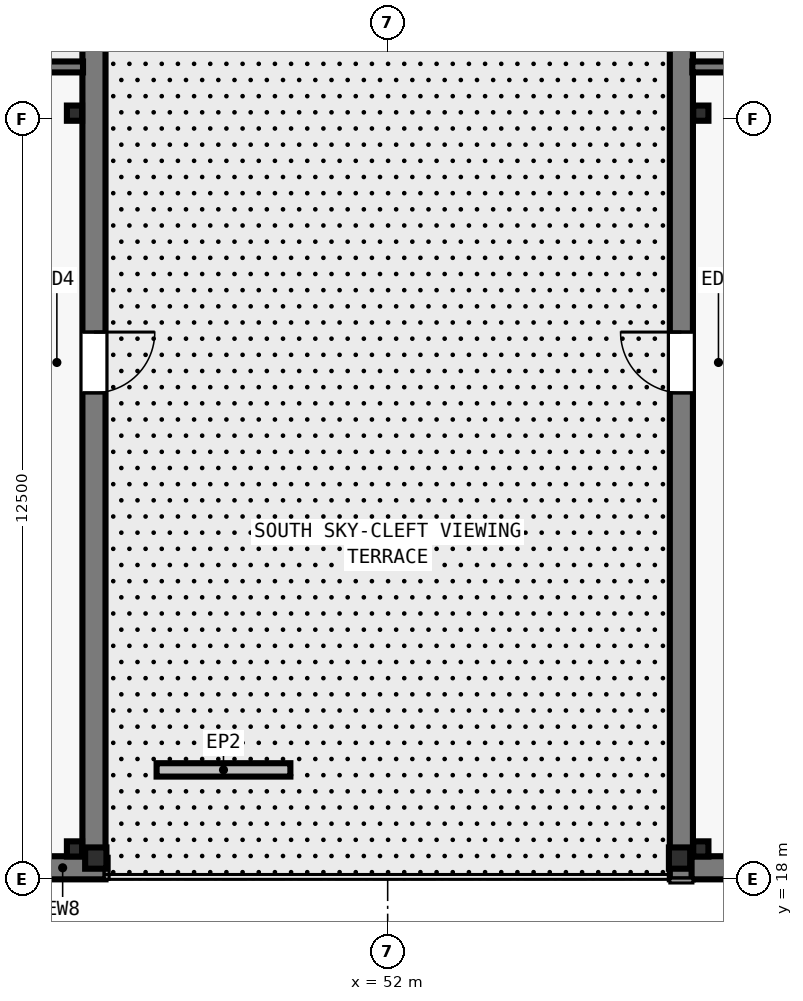
"""IFC4 building model, lengths in metres.
Left out: names, types, materials, properties, quantities, classifications, styles, units other than length and angle.
Written with IfcOpenShell. Run it as: python <this file> out.ifc"""

import sys

from ifc_helpers import new_model, si_unit, direction, frame, frame_2d, origin, origin_2d, place, context, subcontext, project, spatial, rectangle, i_section, extrude, element, fill, save


model = new_model("IFC4")
c1 = context("Model", 3, precision=1e-05, world=origin(), true_north=direction((0.0, 1.0)))
c2 = subcontext(c1, "Body", "Model", "MODEL_VIEW")
j1 = project(units=[si_unit("LENGTHUNIT", "METRE"), si_unit("PLANEANGLEUNIT", "RADIAN")], contexts=[c1])
p1 = place(None, origin())
s1 = spatial("IfcSite", under=j1, at=p1, CompositionType="ELEMENT")
p2 = place(p1, origin())
s2 = spatial("IfcBuilding", under=s1, at=p2, CompositionType="ELEMENT")
p3 = place(p2, frame((0.0, 0.0, 324.5)))
s3 = spatial("IfcBuildingStorey", under=s2, at=p3, CompositionType="ELEMENT", Elevation=324.5)
for number, where, z_axis, x_axis in (
    (1, (47.2, 18.35, 0.0), (0.0, 0.0, 1.0), (1.0, 0.0, 0.0)),
    (2, (56.8, 18.35, 0.0), (0.0, 0.0, 1.0), (1.0, 0.0, 0.0)),
):
    element("IfcColumn", number, at=place(p3, frame(where, z_axis=z_axis, x_axis=x_axis)), inside=s3, PredefinedType="COLUMN", context=c2, shape_type="SweptSolid", body=[
        extrude(i_section(OverallWidth=0.35, OverallDepth=0.35, WebThickness=0.02, FlangeThickness=0.028, at=origin_2d()), origin(), (0.0, 0.0, 1.0), 5.5),
    ])
for number, where, z_axis, x_axis in (
    (3, (46.85, 18.5, 0.0), (0.0, 0.0, 1.0), (1.0, 0.0, 0.0)),
    (4, (46.85, 30.6, 0.0), (0.0, 0.0, 1.0), (1.0, 0.0, 0.0)),
    (5, (57.15, 18.5, 0.0), (0.0, 0.0, 1.0), (1.0, 0.0, 0.0)),
    (6, (57.15, 30.6, 0.0), (0.0, 0.0, 1.0), (1.0, 0.0, 0.0)),
):
    element("IfcColumn", number, at=place(p3, frame(where, z_axis=z_axis, x_axis=x_axis)), inside=s3, PredefinedType="PILASTER", context=c2, shape_type="SweptSolid", body=[
        extrude(i_section(OverallWidth=0.203, OverallDepth=0.203, WebThickness=0.009, FlangeThickness=0.014, FilletRadius=0.01, at=origin_2d()), origin(), (0.0, 0.0, 1.0), 5.5),
    ])
p4 = place(p3, frame((47.17, 60.0, 0.0), z_axis=(0.0, 0.0, 1.0), x_axis=(0.0, -1.0, 0.0)))
e7 = element("IfcWall", 7, at=p4, inside=s3, PredefinedType="SOLIDWALL", context=c2, shape_type="SweptSolid", body=[
    extrude(rectangle(XDim=41.642, YDim=0.38, at=frame_2d((20.821, 0.0))), origin(), (0.0, 0.0, 1.0), 5.25),
])
p5 = place(p4, frame((9.0, 0.0, 0.0)))
e8 = element("IfcOpeningElement", 8, at=p5, cuts=e7, PredefinedType="OPENING", context=c2, shape_type="SweptSolid", body=[
    extrude(rectangle(XDim=1.0, YDim=2.15, at=frame_2d((0.5, 1.075))), frame((0.0, 0.2, 0.0), z_axis=(0.0, -1.0, 0.0), x_axis=(1.0, 0.0, 0.0)), (0.0, 0.0, 1.0), 0.4),
])
p6 = place(p4, frame((33.0, 0.0, 0.0)))
e9 = element("IfcOpeningElement", 9, at=p6, cuts=e7, PredefinedType="OPENING", context=c2, shape_type="SweptSolid", body=[
    extrude(rectangle(XDim=1.0, YDim=2.15, at=frame_2d((0.5, 1.075))), frame((0.0, 0.2, 0.0), z_axis=(0.0, -1.0, 0.0), x_axis=(1.0, 0.0, 0.0)), (0.0, 0.0, 1.0), 0.4),
])
p7 = place(p3, frame((47.36, 18.19, 0.0), z_axis=(0.0, 0.0, 1.0), x_axis=(-1.0, 0.0, 0.0)))
e10 = element("IfcWall", 10, at=p7, inside=s3, PredefinedType="SOLIDWALL", context=c2, shape_type="SweptSolid", body=[
    extrude(rectangle(XDim=1.41, YDim=0.38, at=frame_2d((0.705, 0.0))), origin(), (0.0, 0.0, 1.0), 5.25),
])
p8 = place(p3, frame((56.83, 18.0, 0.0), z_axis=(0.0, 0.0, 1.0), x_axis=(0.0, 1.0, 0.0)))
e11 = element("IfcWall", 11, at=p8, inside=s3, PredefinedType="SOLIDWALL", context=c2, shape_type="SweptSolid", body=[
    extrude(rectangle(XDim=41.642, YDim=0.38, at=frame_2d((20.821, 0.0))), origin(), (0.0, 0.0, 1.0), 5.25),
])
p9 = place(p8, frame((32.0, 0.0, 0.0)))
e12 = element("IfcOpeningElement", 12, at=p9, cuts=e11, PredefinedType="OPENING", context=c2, shape_type="SweptSolid", body=[
    extrude(rectangle(XDim=1.0, YDim=2.15, at=frame_2d((0.5, 1.075))), frame((0.0, 0.2, 0.0), z_axis=(0.0, -1.0, 0.0), x_axis=(1.0, 0.0, 0.0)), (0.0, 0.0, 1.0), 0.4),
])
p10 = place(p8, frame((8.0, 0.0, 0.0)))
e13 = element("IfcOpeningElement", 13, at=p10, cuts=e11, PredefinedType="OPENING", context=c2, shape_type="SweptSolid", body=[
    extrude(rectangle(XDim=1.0, YDim=2.15, at=frame_2d((0.5, 1.075))), frame((0.0, 0.2, 0.0), z_axis=(0.0, -1.0, 0.0), x_axis=(1.0, 0.0, 0.0)), (0.0, 0.0, 1.0), 0.4),
])
p11 = place(p3, frame((58.05, 18.19, 0.0), z_axis=(0.0, 0.0, 1.0), x_axis=(-1.0, 0.0, 0.0)))
e14 = element("IfcWall", 14, at=p11, inside=s3, PredefinedType="SOLIDWALL", context=c2, shape_type="SweptSolid", body=[
    extrude(rectangle(XDim=1.052, YDim=0.38, at=frame_2d((0.526, 0.0))), origin(), (0.0, 0.0, 1.0), 5.25),
])
p12 = place(p3, frame((48.2, 19.8, 0.0), z_axis=(0.0, 0.0, 1.0), x_axis=(1.0, 0.0, 0.0)))
e15 = element("IfcWall", 15, at=p12, inside=s3, PredefinedType="PARAPET", context=c2, shape_type="SweptSolid", body=[
    extrude(rectangle(XDim=2.2, YDim=0.22, at=frame_2d((1.1, 0.0))), origin(), (0.0, 0.0, 1.0), 0.55),
])
for number, where, z_axis, x_axis in (
    (16, (43.825, 31.36, 0.0), (0.0, 0.0, 1.0), (1.0, 0.0, 0.0)),
    (17, (57.01, 31.36, 0.0), (0.0, 0.0, 1.0), (1.0, 0.0, 0.0)),
):
    element("IfcWall", number, at=place(p3, frame(where, z_axis=z_axis, x_axis=x_axis)), inside=s3, PredefinedType="SOLIDWALL", context=c2, shape_type="SweptSolid", body=[
        extrude(rectangle(XDim=3.165, YDim=0.18, at=frame_2d((1.583, 0.0))), origin(), (0.0, 0.0, 1.0), 5.25),
    ])
p13 = place(p6, origin())
e18 = element("IfcDoor", 18, at=p13, inside=s3, OperationType="SINGLE_SWING_LEFT", PredefinedType="DOOR", context=c2, shape_type="SweptSolid", body=[
    extrude(rectangle(XDim=1.0, YDim=2.15, at=frame_2d((0.5, 1.075))), frame((0.0, 0.025, 0.0), z_axis=(0.0, -1.0, 0.0), x_axis=(1.0, 0.0, 0.0)), (0.0, 0.0, 1.0), 0.05),
])
fill(e9, e18)
p14 = place(p10, origin())
e19 = element("IfcDoor", 19, at=p14, inside=s3, OperationType="SINGLE_SWING_RIGHT", PredefinedType="DOOR", context=c2, shape_type="SweptSolid", body=[
    extrude(rectangle(XDim=1.0, YDim=2.15, at=frame_2d((0.5, 1.075))), frame((0.0, 0.025, 0.0), z_axis=(0.0, -1.0, 0.0), x_axis=(1.0, 0.0, 0.0)), (0.0, 0.0, 1.0), 0.05),
])
fill(e13, e19)
save(model, sys.argv[1])
